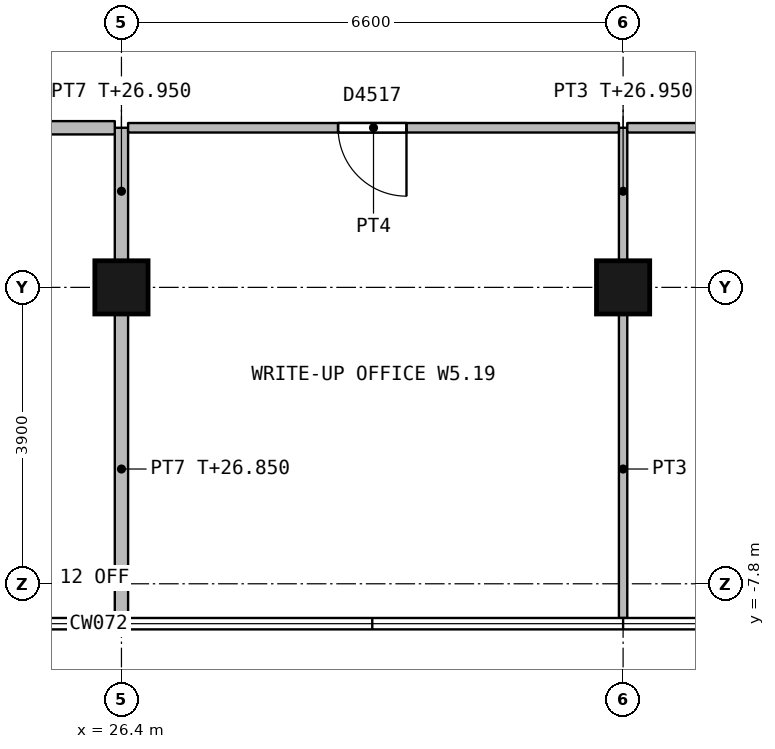
"""IFC4 building model, lengths in metres.
Left out: names, types, materials, properties, quantities, classifications, styles, units other than length and angle.
Written with IfcOpenShell. Run it as: python <this file> out.ifc"""

import sys

from ifc_helpers import new_model, si_unit, direction, frame, frame_2d, origin, origin_2d, place, context, subcontext, project, spatial, rectangle, extrude, element, fill, save


model = new_model("IFC4")
c1 = context("Model", 3, precision=1e-05, world=origin(), true_north=direction((0.0, 1.0)))
c2 = subcontext(c1, "Body", "Model", "MODEL_VIEW")
j1 = project(units=[si_unit("LENGTHUNIT", "METRE"), si_unit("PLANEANGLEUNIT", "RADIAN")], contexts=[c1])
p1 = place(None, origin())
s1 = spatial("IfcSite", under=j1, at=p1, CompositionType="ELEMENT")
p2 = place(p1, origin())
s2 = spatial("IfcBuilding", under=s1, at=p2, CompositionType="ELEMENT")
p3 = place(p2, frame((0.0, 0.0, 23.4)))
s3 = spatial("IfcBuildingStorey", under=s2, at=p3, CompositionType="ELEMENT", Elevation=23.4)
for number, where, z_axis, x_axis in (
    (1, (26.4, -3.9, 0.0), (0.0, 0.0, 1.0), (1.0, 0.0, 0.0)),
    (2, (33.0, -3.9, 0.0), (0.0, 0.0, 1.0), (1.0, 0.0, 0.0)),
):
    element("IfcColumn", number, at=place(p3, frame(where, z_axis=z_axis, x_axis=x_axis)), inside=s3, PredefinedType="COLUMN", context=c2, shape_type="SweptSolid", body=[
        extrude(rectangle(XDim=0.7, YDim=0.7, at=origin_2d()), origin(), (0.0, 0.0, 1.0), 4.25),
    ])
p4 = place(p3, frame((26.4, -8.25, 0.0), z_axis=(0.0, 0.0, 1.0), x_axis=(0.0, 1.0, 0.0)))
e3 = element("IfcWall", 3, at=p4, inside=s3, PredefinedType="PARTITIONING", context=c2, shape_type="SweptSolid", body=[
    extrude(rectangle(XDim=4.0, YDim=0.175, at=frame_2d((2.0, 0.0))), origin(), (0.0, 0.0, 1.0), 3.45),
])
p5 = place(p3, frame((26.4, -3.55, 0.0), z_axis=(0.0, 0.0, 1.0), x_axis=(0.0, 1.0, 0.0)))
e4 = element("IfcWall", 4, at=p5, inside=s3, PredefinedType="PARTITIONING", context=c2, shape_type="SweptSolid", body=[
    extrude(rectangle(XDim=1.75, YDim=0.175, at=frame_2d((0.875, 0.0))), origin(), (0.0, 0.0, 1.0), 3.55),
])
p6 = place(p3, frame((26.312, -1.8, 0.0), z_axis=(0.0, 0.0, 1.0), x_axis=(-1.0, 0.0, 0.0)))
e5 = element("IfcWall", 5, at=p6, inside=s3, PredefinedType="PARTITIONING", context=c2, shape_type="SweptSolid", body=[
    extrude(rectangle(XDim=6.425, YDim=0.175, at=frame_2d((3.212, 0.0))), origin(), (0.0, 0.0, 1.0), 4.25),
])
p7 = place(p6, frame((2.712, 0.0, 0.0)))
e6 = element("IfcOpeningElement", 6, at=p7, cuts=e5, PredefinedType="OPENING", context=c2, shape_type="SweptSolid", body=[
    extrude(rectangle(XDim=1.0, YDim=2.1, at=frame_2d((0.5, 1.05))), frame((0.0, 0.097, 0.0), z_axis=(0.0, -1.0, 0.0), x_axis=(1.0, 0.0, 0.0)), (0.0, 0.0, 1.0), 0.195),
])
p8 = place(p3, frame((33.0, -8.25, 0.0), z_axis=(0.0, 0.0, 1.0), x_axis=(0.0, 1.0, 0.0)))
e7 = element("IfcWall", 7, at=p8, inside=s3, PredefinedType="PARTITIONING", context=c2, shape_type="SweptSolid", body=[
    extrude(rectangle(XDim=4.0, YDim=0.11, at=frame_2d((2.0, 0.0))), origin(), (0.0, 0.0, 1.0), 3.45),
])
p9 = place(p3, frame((33.0, -3.55, 0.0), z_axis=(0.0, 0.0, 1.0), x_axis=(0.0, 1.0, 0.0)))
e8 = element("IfcWall", 8, at=p9, inside=s3, PredefinedType="PARTITIONING", context=c2, shape_type="SweptSolid", body=[
    extrude(rectangle(XDim=1.75, YDim=0.11, at=frame_2d((0.875, 0.0))), origin(), (0.0, 0.0, 1.0), 3.55),
])
p10 = place(p3, frame((32.945, -1.8, 0.0), z_axis=(0.0, 0.0, 1.0), x_axis=(-1.0, 0.0, 0.0)))
e9 = element("IfcWall", 9, at=p10, inside=s3, PredefinedType="PARTITIONING", context=c2, shape_type="SweptSolid", body=[
    extrude(rectangle(XDim=6.458, YDim=0.125, at=frame_2d((3.229, 0.0))), origin(), (0.0, 0.0, 1.0), 4.25),
])
p11 = place(p10, frame((2.795, 0.0, 0.0)))
e10 = element("IfcOpeningElement", 10, at=p11, cuts=e9, PredefinedType="OPENING", context=c2, shape_type="SweptSolid", body=[
    extrude(rectangle(XDim=0.9, YDim=2.1, at=frame_2d((0.45, 1.05))), frame((0.0, 0.073, 0.0), z_axis=(0.0, -1.0, 0.0), x_axis=(1.0, 0.0, 0.0)), (0.0, 0.0, 1.0), 0.145),
])
p12 = place(p3, frame((39.545, -1.8, 0.0), z_axis=(0.0, 0.0, 1.0), x_axis=(-1.0, 0.0, 0.0)))
e11 = element("IfcWall", 11, at=p12, inside=s3, PredefinedType="PARTITIONING", context=c2, shape_type="SweptSolid", body=[
    extrude(rectangle(XDim=6.49, YDim=0.125, at=frame_2d((3.245, 0.0))), origin(), (0.0, 0.0, 1.0), 4.25),
])
p13 = place(p12, frame((2.795, 0.0, 0.0)))
e12 = element("IfcOpeningElement", 12, at=p13, cuts=e11, PredefinedType="OPENING", context=c2, shape_type="SweptSolid", body=[
    extrude(rectangle(XDim=0.9, YDim=2.1, at=frame_2d((0.45, 1.05))), frame((0.0, 0.073, 0.0), z_axis=(0.0, -1.0, 0.0), x_axis=(1.0, 0.0, 0.0)), (0.0, 0.0, 1.0), 0.145),
])
p14 = place(p11, origin())
e13 = element("IfcDoor", 13, at=p14, inside=s3, OperationType="SINGLE_SWING_LEFT", PredefinedType="DOOR", context=c2, shape_type="SweptSolid", body=[
    extrude(rectangle(XDim=0.9, YDim=2.1, at=frame_2d((0.45, 1.05))), frame((0.0, 0.027, 0.0), z_axis=(0.0, -1.0, 0.0), x_axis=(1.0, 0.0, 0.0)), (0.0, 0.0, 1.0), 0.054),
])
fill(e10, e13)
save(model, sys.argv[1])
